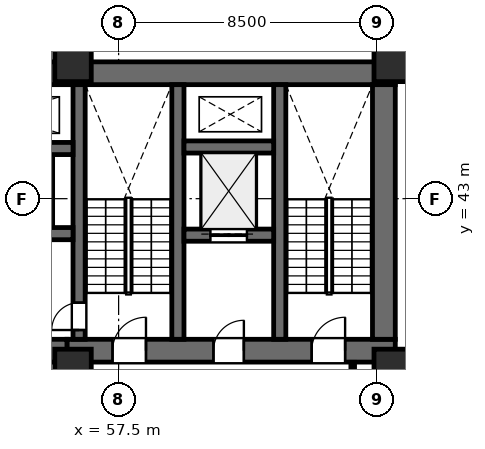
"""IFC4 building model, lengths in metres.
Left out: names, types, materials, properties, quantities, classifications, styles, units other than length and angle.
Written with IfcOpenShell. Run it as: python <this file> out.ifc"""

import sys

from ifc_helpers import new_model, si_unit, direction, frame, frame_2d, origin, origin_2d, place, context, subcontext, project, spatial, rectangle, extrude, element, fill, save


model = new_model("IFC4")
c1 = context("Model", 3, precision=1e-05, world=origin(), true_north=direction((0.0, 1.0)))
c2 = subcontext(c1, "Body", "Model", "MODEL_VIEW")
j1 = project(units=[si_unit("LENGTHUNIT", "METRE"), si_unit("PLANEANGLEUNIT", "RADIAN")], contexts=[c1])
p1 = place(None, origin())
s1 = spatial("IfcSite", under=j1, at=p1, CompositionType="ELEMENT")
p2 = place(p1, origin())
s2 = spatial("IfcBuilding", under=s1, at=p2, CompositionType="ELEMENT")
p3 = place(p2, frame((0.0, 0.0, 53.5)))
s3 = spatial("IfcBuildingStorey", under=s2, at=p3, CompositionType="ELEMENT", Elevation=53.5)
p4 = place(p3, frame((22.9, 47.125, 0.0), z_axis=(0.0, 0.0, 1.0), x_axis=(1.0, 0.0, 0.0)))
e1 = element("IfcWall", 1, at=p4, inside=s3, PredefinedType="SHEAR", context=c2, shape_type="SweptSolid", body=[
    extrude(rectangle(XDim=43.7, YDim=0.75, at=frame_2d((21.85, 0.0))), origin(), (0.0, 0.0, 1.0), 4.0),
])
p5 = place(p3, frame((55.8, 38.0, 0.0), z_axis=(0.0, 0.0, 1.0), x_axis=(1.0, 0.0, 0.0)))
e2 = element("IfcWall", 2, at=p5, inside=s3, PredefinedType="SHEAR", context=c2, shape_type="SweptSolid", body=[
    extrude(rectangle(XDim=10.8, YDim=0.75, at=frame_2d((5.4, 0.0))), origin(), (0.0, 0.0, 1.0), 4.0),
])
p6 = place(p5, frame((1.5, 0.0, 0.0)))
e3 = element("IfcOpeningElement", 3, at=p6, cuts=e2, PredefinedType="OPENING", context=c2, shape_type="SweptSolid", body=[
    extrude(rectangle(XDim=1.1, YDim=2.2, at=frame_2d((0.55, 1.1))), frame((0.0, 0.385, 0.0), z_axis=(0.0, -1.0, 0.0), x_axis=(1.0, 0.0, 0.0)), (0.0, 0.0, 1.0), 0.77),
])
p7 = place(p5, frame((4.82, 0.0, 0.0)))
e4 = element("IfcOpeningElement", 4, at=p7, cuts=e2, PredefinedType="OPENING", context=c2, shape_type="SweptSolid", body=[
    extrude(rectangle(XDim=1.0, YDim=2.15, at=frame_2d((0.5, 1.075))), frame((0.0, 0.385, 0.0), z_axis=(0.0, -1.0, 0.0), x_axis=(1.0, 0.0, 0.0)), (0.0, 0.0, 1.0), 0.77),
])
p8 = place(p5, frame((8.05, 0.0, 0.0)))
e5 = element("IfcOpeningElement", 5, at=p8, cuts=e2, PredefinedType="OPENING", context=c2, shape_type="SweptSolid", body=[
    extrude(rectangle(XDim=1.1, YDim=2.2, at=frame_2d((0.55, 1.1))), frame((0.0, 0.385, 0.0), z_axis=(0.0, -1.0, 0.0), x_axis=(1.0, 0.0, 0.0)), (0.0, 0.0, 1.0), 0.77),
])
p9 = place(p3, frame((66.225, 38.375, 0.0), z_axis=(0.0, 0.0, 1.0), x_axis=(0.0, 1.0, 0.0)))
e6 = element("IfcWall", 6, at=p9, inside=s3, PredefinedType="SHEAR", context=c2, shape_type="SweptSolid", body=[
    extrude(rectangle(XDim=8.375, YDim=0.75, at=frame_2d((4.188, 0.0))), origin(), (0.0, 0.0, 1.0), 4.0),
])
for number, where, z_axis, x_axis in (
    (7, (62.8, 38.375, 0.0), (0.0, 0.0, 1.0), (0.0, 1.0, 0.0)),
    (8, (59.45, 38.375, 0.0), (0.0, 0.0, 1.0), (0.0, 1.0, 0.0)),
):
    element("IfcWall", number, at=place(p3, frame(where, z_axis=z_axis, x_axis=x_axis)), inside=s3, PredefinedType="SHEAR", context=c2, shape_type="SweptSolid", body=[
        extrude(rectangle(XDim=8.375, YDim=0.4, at=frame_2d((4.188, 0.0))), origin(), (0.0, 0.0, 1.0), 4.0),
    ])
p10 = place(p3, frame((56.2, 38.375, 0.0), z_axis=(0.0, 0.0, 1.0), x_axis=(0.0, 1.0, 0.0)))
e9 = element("IfcWall", 9, at=p10, inside=s3, PredefinedType="SHEAR", context=c2, shape_type="SweptSolid", body=[
    extrude(rectangle(XDim=8.375, YDim=0.4, at=frame_2d((4.188, 0.0))), origin(), (0.0, 0.0, 1.0), 4.0),
])
p11 = place(p10, frame((0.305, 0.0, 0.0)))
e10 = element("IfcOpeningElement", 10, at=p11, cuts=e9, PredefinedType="OPENING", context=c2, shape_type="SweptSolid", body=[
    extrude(rectangle(XDim=0.9, YDim=2.15, at=frame_2d((0.45, 1.075))), frame((0.0, 0.21, 0.0), z_axis=(0.0, -1.0, 0.0), x_axis=(1.0, 0.0, 0.0)), (0.0, 0.0, 1.0), 0.42),
])
p12 = place(p3, frame((59.65, 41.8, 0.0), z_axis=(0.0, 0.0, 1.0), x_axis=(1.0, 0.0, 0.0)))
e11 = element("IfcWall", 11, at=p12, inside=s3, PredefinedType="SHEAR", context=c2, shape_type="SweptSolid", body=[
    extrude(rectangle(XDim=2.95, YDim=0.4, at=frame_2d((1.475, 0.0))), origin(), (0.0, 0.0, 1.0), 4.0),
])
p13 = place(p12, frame((0.87, 0.0, 0.0)))
e12 = element("IfcOpeningElement", 12, at=p13, cuts=e11, PredefinedType="OPENING", context=c2, shape_type="SweptSolid", body=[
    extrude(rectangle(XDim=1.2, YDim=2.2, at=frame_2d((0.6, 1.1))), frame((0.0, 0.21, 0.0), z_axis=(0.0, -1.0, 0.0), x_axis=(1.0, 0.0, 0.0)), (0.0, 0.0, 1.0), 0.42),
])
p14 = place(p3, frame((59.65, 44.7, 0.0), z_axis=(0.0, 0.0, 1.0), x_axis=(1.0, 0.0, 0.0)))
e13 = element("IfcWall", 13, at=p14, inside=s3, PredefinedType="SHEAR", context=c2, shape_type="SweptSolid", body=[
    extrude(rectangle(XDim=2.95, YDim=0.4, at=frame_2d((1.475, 0.0))), origin(), (0.0, 0.0, 1.0), 4.0),
])
p15 = place(p3, frame((50.8, 38.0, 0.0), z_axis=(0.0, 0.0, 1.0), x_axis=(1.0, 0.0, 0.0)))
e14 = element("IfcWall", 14, at=p15, inside=s3, PredefinedType="SHEAR", context=c2, shape_type="SweptSolid", body=[
    extrude(rectangle(XDim=5.0, YDim=0.75, at=frame_2d((2.5, 0.0))), origin(), (0.0, 0.0, 1.0), 4.0),
])
p16 = place(p15, frame((2.0, 0.0, 0.0)))
e15 = element("IfcOpeningElement", 15, at=p16, cuts=e14, PredefinedType="OPENING", context=c2, shape_type="SweptSolid", body=[
    extrude(rectangle(XDim=1.2, YDim=2.2, at=frame_2d((0.6, 1.1))), frame((0.0, 0.385, 0.0), z_axis=(0.0, -1.0, 0.0), x_axis=(1.0, 0.0, 0.0)), (0.0, 0.0, 1.0), 0.77),
])
p17 = place(p3, frame((51.25, 41.85, 0.0), z_axis=(0.0, 0.0, 1.0), x_axis=(1.0, 0.0, 0.0)))
e16 = element("IfcWall", 16, at=p17, inside=s3, PredefinedType="SHEAR", context=c2, shape_type="SweptSolid", body=[
    extrude(rectangle(XDim=4.75, YDim=0.4, at=frame_2d((2.375, 0.0))), origin(), (0.0, 0.0, 1.0), 4.0),
])
p18 = place(p17, frame((0.5, 0.0, 0.0)))
e17 = element("IfcOpeningElement", 17, at=p18, cuts=e16, PredefinedType="OPENING", context=c2, shape_type="SweptSolid", body=[
    extrude(rectangle(XDim=1.2, YDim=2.2, at=frame_2d((0.6, 1.1))), frame((0.0, 0.21, 0.0), z_axis=(0.0, -1.0, 0.0), x_axis=(1.0, 0.0, 0.0)), (0.0, 0.0, 1.0), 0.42),
])
p19 = place(p17, frame((2.6, 0.0, 0.0)))
e18 = element("IfcOpeningElement", 18, at=p19, cuts=e16, PredefinedType="OPENING", context=c2, shape_type="SweptSolid", body=[
    extrude(rectangle(XDim=1.2, YDim=2.2, at=frame_2d((0.6, 1.1))), frame((0.0, 0.21, 0.0), z_axis=(0.0, -1.0, 0.0), x_axis=(1.0, 0.0, 0.0)), (0.0, 0.0, 1.0), 0.42),
])
p20 = place(p3, frame((51.25, 44.65, 0.0), z_axis=(0.0, 0.0, 1.0), x_axis=(1.0, 0.0, 0.0)))
e19 = element("IfcWall", 19, at=p20, inside=s3, PredefinedType="SHEAR", context=c2, shape_type="SweptSolid", body=[
    extrude(rectangle(XDim=4.75, YDim=0.4, at=frame_2d((2.375, 0.0))), origin(), (0.0, 0.0, 1.0), 4.0),
])
for number, where, z_axis, x_axis in (
    (20, (66.5, 47.55, 0.0), (0.0, 0.0, 1.0), (1.0, 0.0, 0.0)),
    (21, (56.0, 47.55, 0.0), (0.0, 0.0, 1.0), (1.0, 0.0, 0.0)),
    (22, (66.5, 37.35, 0.0), (0.0, 0.0, 1.0), (1.0, 0.0, 0.0)),
    (23, (56.0, 37.35, 0.0), (0.0, 0.0, 1.0), (1.0, 0.0, 0.0)),
):
    element("IfcColumn", number, at=place(p3, frame(where, z_axis=z_axis, x_axis=x_axis)), inside=s3, PredefinedType="COLUMN", context=c2, shape_type="SweptSolid", body=[
        extrude(rectangle(XDim=1.2, YDim=1.4, at=origin_2d()), origin(), (0.0, 0.0, 1.0), 4.0),
    ])
p21 = place(p3, frame((68.375, 37.8, 0.0), z_axis=(0.0, 0.0, 1.0), x_axis=(-0.139174610616, -0.990267856572, 0.0)))
e24 = element("IfcWall", 24, at=p21, inside=s3, PredefinedType="STANDARD", context=c2, shape_type="SweptSolid", body=[
    extrude(rectangle(XDim=34.6, YDim=0.28, at=frame_2d((17.3, 0.0))), origin(), (0.0, 0.0, 1.0), 3.74),
])
p22 = place(p21, frame((8.279, 0.0, 0.0)))
e25 = element("IfcOpeningElement", 25, at=p22, cuts=e24, PredefinedType="OPENING", context=c2, shape_type="SweptSolid", body=[
    extrude(rectangle(XDim=1.0, YDim=2.15, at=frame_2d((0.5, 1.075))), frame((0.0, 0.15, 0.0), z_axis=(0.0, -1.0, 0.0), x_axis=(1.0, 0.0, 0.0)), (0.0, 0.0, 1.0), 0.3),
])
p23 = place(p21, frame((3.972, 0.0, 0.65)))
e26 = element("IfcOpeningElement", 26, at=p23, cuts=e24, PredefinedType="OPENING", context=c2, shape_type="SweptSolid", body=[
    extrude(rectangle(XDim=1.8, YDim=2.1, at=frame_2d((0.9, 1.05))), frame((0.0, 0.15, 0.0), z_axis=(0.0, -1.0, 0.0), x_axis=(1.0, 0.0, 0.0)), (0.0, 0.0, 1.0), 0.3),
])
p24 = place(p21, frame((20.783, 0.0, 0.65)))
e27 = element("IfcOpeningElement", 27, at=p24, cuts=e24, PredefinedType="OPENING", context=c2, shape_type="SweptSolid", body=[
    extrude(rectangle(XDim=1.8, YDim=2.1, at=frame_2d((0.9, 1.05))), frame((0.0, 0.15, 0.0), z_axis=(0.0, -1.0, 0.0), x_axis=(1.0, 0.0, 0.0)), (0.0, 0.0, 1.0), 0.3),
])
p25 = place(p3, frame((65.2, 34.4, 0.0), z_axis=(0.0, 0.0, 1.0), x_axis=(0.0, 1.0, 0.0)))
e28 = element("IfcWall", 28, at=p25, inside=s3, PredefinedType="PARTITIONING", context=c2, shape_type="SweptSolid", body=[
    extrude(rectangle(XDim=3.217, YDim=0.12, at=frame_2d((1.608, 0.0))), origin(), (0.0, 0.0, 1.0), 2.813),
])
p26 = place(p6, origin())
e29 = element("IfcDoor", 29, at=p26, inside=s3, OperationType="SINGLE_SWING_RIGHT", PredefinedType="DOOR", context=c2, shape_type="SweptSolid", body=[
    extrude(rectangle(XDim=1.1, YDim=2.2, at=frame_2d((0.55, 1.1))), frame((0.0, 0.025, 0.0), z_axis=(0.0, -1.0, 0.0), x_axis=(1.0, 0.0, 0.0)), (0.0, 0.0, 1.0), 0.05),
])
fill(e3, e29)
p27 = place(p7, origin())
e30 = element("IfcDoor", 30, at=p27, inside=s3, OperationType="SINGLE_SWING_RIGHT", PredefinedType="DOOR", context=c2, shape_type="SweptSolid", body=[
    extrude(rectangle(XDim=1.0, YDim=2.15, at=frame_2d((0.5, 1.075))), frame((0.0, 0.025, 0.0), z_axis=(0.0, -1.0, 0.0), x_axis=(1.0, 0.0, 0.0)), (0.0, 0.0, 1.0), 0.05),
])
fill(e4, e30)
p28 = place(p8, origin())
e31 = element("IfcDoor", 31, at=p28, inside=s3, OperationType="SINGLE_SWING_RIGHT", PredefinedType="DOOR", context=c2, shape_type="SweptSolid", body=[
    extrude(rectangle(XDim=1.1, YDim=2.2, at=frame_2d((0.55, 1.1))), frame((0.0, 0.025, 0.0), z_axis=(0.0, -1.0, 0.0), x_axis=(1.0, 0.0, 0.0)), (0.0, 0.0, 1.0), 0.05),
])
fill(e5, e31)
p29 = place(p11, origin())
e32 = element("IfcDoor", 32, at=p29, inside=s3, OperationType="SINGLE_SWING_LEFT", PredefinedType="DOOR", context=c2, shape_type="SweptSolid", body=[
    extrude(rectangle(XDim=0.9, YDim=2.15, at=frame_2d((0.45, 1.075))), frame((0.0, 0.025, 0.0), z_axis=(0.0, -1.0, 0.0), x_axis=(1.0, 0.0, 0.0)), (0.0, 0.0, 1.0), 0.05),
])
fill(e10, e32)
p30 = place(p13, origin())
e33 = element("IfcDoor", 33, at=p30, inside=s3, OperationType="DOUBLE_DOOR_SLIDING", PredefinedType="DOOR", context=c2, shape_type="SweptSolid", body=[
    extrude(rectangle(XDim=1.2, YDim=2.2, at=frame_2d((0.6, 1.1))), frame((0.0, 0.025, 0.0), z_axis=(0.0, -1.0, 0.0), x_axis=(1.0, 0.0, 0.0)), (0.0, 0.0, 1.0), 0.05),
])
fill(e12, e33)
save(model, sys.argv[1])
